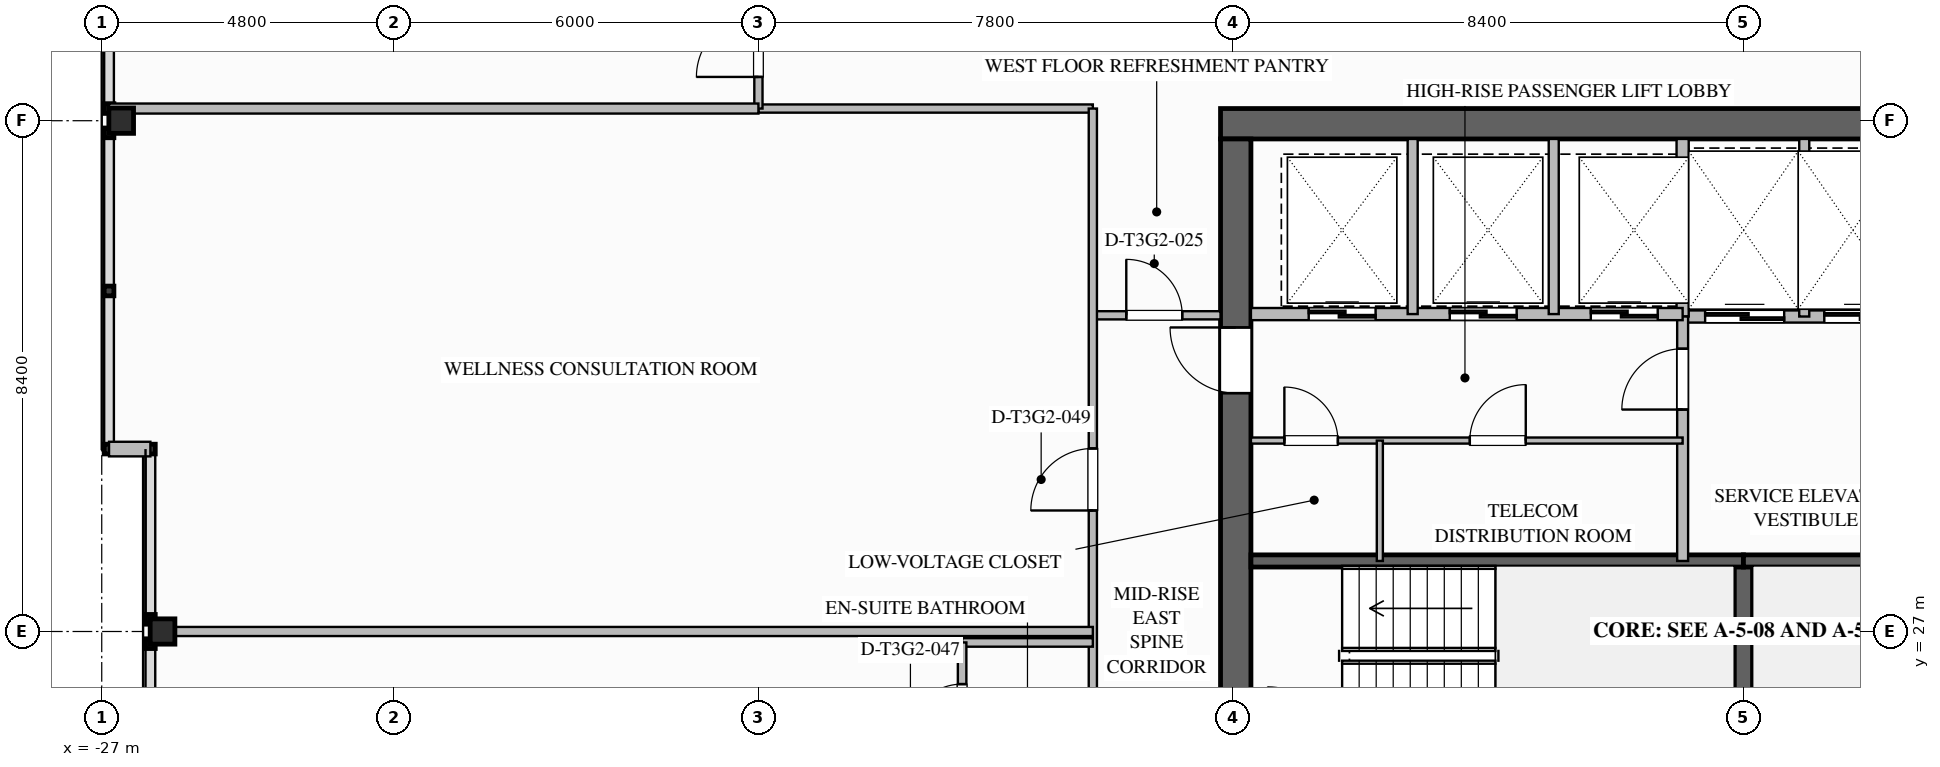
"""IFC4 building model, lengths in metres.
Left out: names, types, materials, properties, quantities, classifications, styles, units other than length and angle.
Written with IfcOpenShell. Run it as: python <this file> out.ifc"""

import sys

from ifc_helpers import new_model, si_unit, direction, frame, frame_2d, origin, origin_2d, place, context, subcontext, project, spatial, rectangle, i_section, extrude, element, fill, save


model = new_model("IFC4")
c1 = context("Model", 3, precision=1e-05, world=origin(), true_north=direction((0.0, 1.0)))
c2 = subcontext(c1, "Body", "Model", "MODEL_VIEW")
j1 = project(units=[si_unit("LENGTHUNIT", "METRE"), si_unit("PLANEANGLEUNIT", "RADIAN")], contexts=[c1])
p1 = place(None, origin())
s1 = spatial("IfcSite", under=j1, at=p1, CompositionType="ELEMENT")
p2 = place(p1, origin())
s2 = spatial("IfcBuilding", under=s1, at=p2, CompositionType="ELEMENT")
p3 = place(p2, frame((0.0, 0.0, 161.05)))
s3 = spatial("IfcBuildingStorey", under=s2, at=p3, CompositionType="ELEMENT", Elevation=161.05)
p4 = place(p3, frame((-8.6, 35.35, 0.0), z_axis=(0.0, 0.0, 1.0), x_axis=(1.0, 0.0, 0.0)))
e1 = element("IfcWall", 1, at=p4, inside=s3, PredefinedType="SHEAR", context=c2, shape_type="SweptSolid", body=[
    extrude(rectangle(XDim=17.2, YDim=0.5, at=frame_2d((8.6, 0.0))), origin(), (0.0, 0.0, 1.0), 3.55),
])
p5 = place(p3, frame((-8.35, 18.9, 0.0), z_axis=(0.0, 0.0, 1.0), x_axis=(0.0, 1.0, 0.0)))
e2 = element("IfcWall", 2, at=p5, inside=s3, PredefinedType="SHEAR", context=c2, shape_type="SweptSolid", body=[
    extrude(rectangle(XDim=16.2, YDim=0.5, at=frame_2d((8.1, 0.0))), origin(), (0.0, 0.0, 1.0), 3.55),
])
p6 = place(p5, frame((12.02, 0.0, 0.0)))
e3 = element("IfcOpeningElement", 3, at=p6, cuts=e2, PredefinedType="OPENING", context=c2, shape_type="SweptSolid", body=[
    extrude(rectangle(XDim=1.08, YDim=2.04, at=frame_2d((0.54, 1.02))), frame((0.0, 0.26, 0.0), z_axis=(0.0, -1.0, 0.0), x_axis=(1.0, 0.0, 0.0)), (0.0, 0.0, 1.0), 0.52),
])
p7 = place(p5, frame((4.5, 0.0, 0.0)))
e4 = element("IfcOpeningElement", 4, at=p7, cuts=e2, PredefinedType="OPENING", context=c2, shape_type="SweptSolid", body=[
    extrude(rectangle(XDim=1.08, YDim=2.04, at=frame_2d((0.54, 1.02))), frame((0.0, 0.26, 0.0), z_axis=(0.0, -1.0, 0.0), x_axis=(1.0, 0.0, 0.0)), (0.0, 0.0, 1.0), 0.52),
])
for number, where, z_axis, x_axis in (
    (5, (-26.0, 27.0, 0.0), (0.0, 0.0, 1.0), (1.0, 0.0, 0.0)),
    (6, (-26.68, 35.4, 0.0), (0.0, 0.0, 1.0), (1.0, 0.0, 0.0)),
):
    element("IfcColumn", number, at=place(p3, frame(where, z_axis=z_axis, x_axis=x_axis)), inside=s3, PredefinedType="COLUMN", context=c2, shape_type="SweptSolid", body=[
        extrude(i_section(OverallWidth=0.406, OverallDepth=0.416, WebThickness=0.03, FlangeThickness=0.048, FilletRadius=0.028, at=origin_2d()), origin(), (0.0, 0.0, 1.0), 3.547),
    ])
p8 = place(p3, frame((-26.2, 30.0, 0.0), z_axis=(0.0, 0.0, 1.0), x_axis=(-1.0, 0.0, 0.0)))
e7 = element("IfcWall", 7, at=p8, inside=s3, PredefinedType="STANDARD", context=c2, shape_type="SweptSolid", body=[
    extrude(rectangle(XDim=0.68, YDim=0.24, at=frame_2d((0.34, 0.0))), origin(), (0.0, 0.0, 1.0), 3.29),
])
p9 = place(p3, frame((0.0, 25.04, 0.0), z_axis=(0.0, 0.0, 1.0), x_axis=(0.0, 1.0, 0.0)))
e8 = element("IfcWall", 8, at=p9, inside=s3, PredefinedType="SOLIDWALL", context=c2, shape_type="SweptSolid", body=[
    extrude(rectangle(XDim=3.12, YDim=0.3, at=frame_2d((1.56, 0.0))), origin(), (0.0, 0.0, 1.0), 3.29),
])
p10 = place(p3, frame((-8.1, 28.16, 0.0), z_axis=(0.0, 0.0, 1.0), x_axis=(1.0, 0.0, 0.0)))
e9 = element("IfcWall", 9, at=p10, inside=s3, PredefinedType="SOLIDWALL", context=c2, shape_type="SweptSolid", body=[
    extrude(rectangle(XDim=8.1, YDim=0.2, at=frame_2d((4.05, 0.0))), origin(), (0.0, 0.0, 1.0), 3.29),
])
p11 = place(p3, frame((8.1, 28.16, 0.0), z_axis=(0.0, 0.0, 1.0), x_axis=(-1.0, 0.0, 0.0)))
e10 = element("IfcWall", 10, at=p11, inside=s3, PredefinedType="SOLIDWALL", context=c2, shape_type="SweptSolid", body=[
    extrude(rectangle(XDim=8.1, YDim=0.2, at=frame_2d((4.05, 0.0))), origin(), (0.0, 0.0, 1.0), 3.29),
])
p12 = place(p11, frame((0.28, 0.0, 0.0)))
e11 = element("IfcOpeningElement", 11, at=p12, cuts=e10, PredefinedType="OPENING", context=c2, shape_type="SweptSolid", body=[
    extrude(rectangle(XDim=1.05, YDim=2.1, at=frame_2d((0.525, 1.05))), frame((0.0, 0.11, 0.0), z_axis=(0.0, -1.0, 0.0), x_axis=(1.0, 0.0, 0.0)), (0.0, 0.0, 1.0), 0.22),
])
p13 = place(p3, frame((-1.0, 32.18, 0.0), z_axis=(0.0, 0.0, 1.0), x_axis=(1.0, 0.0, 0.0)))
e12 = element("IfcWall", 12, at=p13, inside=s3, PredefinedType="SOLIDWALL", context=c2, shape_type="SweptSolid", body=[
    extrude(rectangle(XDim=4.1, YDim=0.2, at=frame_2d((2.05, 0.0))), origin(), (0.0, 0.0, 1.0), 3.29),
])
p14 = place(p13, frame((0.37, 0.0, 0.0)))
e13 = element("IfcOpeningElement", 13, at=p14, cuts=e12, PredefinedType="OPENING", context=c2, shape_type="SweptSolid", body=[
    extrude(rectangle(XDim=1.3, YDim=2.2, at=frame_2d((0.65, 1.1))), frame((0.0, 0.11, 0.0), z_axis=(0.0, -1.0, 0.0), x_axis=(1.0, 0.0, 0.0)), (0.0, 0.0, 1.0), 0.22),
])
p15 = place(p13, frame((2.33, 0.0, 0.0)))
e14 = element("IfcOpeningElement", 14, at=p15, cuts=e12, PredefinedType="OPENING", context=c2, shape_type="SweptSolid", body=[
    extrude(rectangle(XDim=1.3, YDim=2.2, at=frame_2d((0.65, 1.1))), frame((0.0, 0.11, 0.0), z_axis=(0.0, -1.0, 0.0), x_axis=(1.0, 0.0, 0.0)), (0.0, 0.0, 1.0), 0.22),
])
p16 = place(p3, frame((-1.0, 32.18, 0.0), z_axis=(0.0, 0.0, 1.0), x_axis=(0.0, 1.0, 0.0)))
e15 = element("IfcWall", 15, at=p16, inside=s3, PredefinedType="SOLIDWALL", context=c2, shape_type="SweptSolid", body=[
    extrude(rectangle(XDim=2.92, YDim=0.2, at=frame_2d((1.46, 0.0))), origin(), (0.0, 0.0, 1.0), 3.29),
])
p17 = place(p3, frame((1.0, 32.18, 0.0), z_axis=(0.0, 0.0, 1.0), x_axis=(0.0, 1.0, 0.0)))
e16 = element("IfcWall", 16, at=p17, inside=s3, PredefinedType="PARTITIONING", context=c2, shape_type="SweptSolid", body=[
    extrude(rectangle(XDim=2.92, YDim=0.165, at=frame_2d((1.46, 0.0))), origin(), (0.0, 0.0, 1.0), 3.29),
])
p18 = place(p3, frame((-1.0, 28.16, 0.0), z_axis=(0.0, 0.0, 1.0), x_axis=(0.0, 1.0, 0.0)))
e17 = element("IfcWall", 17, at=p18, inside=s3, PredefinedType="SOLIDWALL", context=c2, shape_type="SweptSolid", body=[
    extrude(rectangle(XDim=4.02, YDim=0.18, at=frame_2d((2.01, 0.0))), origin(), (0.0, 0.0, 1.0), 3.29),
])
p19 = place(p18, frame((2.49, 0.0, 0.0)))
e18 = element("IfcOpeningElement", 18, at=p19, cuts=e17, PredefinedType="OPENING", context=c2, shape_type="SweptSolid", body=[
    extrude(rectangle(XDim=1.0, YDim=2.1, at=frame_2d((0.5, 1.05))), frame((0.0, 0.1, 0.0), z_axis=(0.0, -1.0, 0.0), x_axis=(1.0, 0.0, 0.0)), (0.0, 0.0, 1.0), 0.2),
])
p20 = place(p3, frame((-8.1, 32.22, 0.0), z_axis=(0.0, 0.0, 1.0), x_axis=(1.0, 0.0, 0.0)))
e19 = element("IfcWall", 19, at=p20, inside=s3, PredefinedType="SOLIDWALL", context=c2, shape_type="SweptSolid", body=[
    extrude(rectangle(XDim=7.1, YDim=0.2, at=frame_2d((3.55, 0.0))), origin(), (0.0, 0.0, 1.0), 3.29),
])
p21 = place(p20, frame((0.95, 0.0, 0.0)))
e20 = element("IfcOpeningElement", 20, at=p21, cuts=e19, PredefinedType="OPENING", context=c2, shape_type="SweptSolid", body=[
    extrude(rectangle(XDim=1.1, YDim=2.2, at=frame_2d((0.55, 1.1))), frame((0.0, 0.11, 0.0), z_axis=(0.0, -1.0, 0.0), x_axis=(1.0, 0.0, 0.0)), (0.0, 0.0, 1.0), 0.22),
])
p22 = place(p20, frame((3.27, 0.0, 0.0)))
e21 = element("IfcOpeningElement", 21, at=p22, cuts=e19, PredefinedType="OPENING", context=c2, shape_type="SweptSolid", body=[
    extrude(rectangle(XDim=1.1, YDim=2.2, at=frame_2d((0.55, 1.1))), frame((0.0, 0.11, 0.0), z_axis=(0.0, -1.0, 0.0), x_axis=(1.0, 0.0, 0.0)), (0.0, 0.0, 1.0), 0.22),
])
p23 = place(p20, frame((5.59, 0.0, 0.0)))
e22 = element("IfcOpeningElement", 22, at=p23, cuts=e19, PredefinedType="OPENING", context=c2, shape_type="SweptSolid", body=[
    extrude(rectangle(XDim=1.1, YDim=2.2, at=frame_2d((0.55, 1.1))), frame((0.0, 0.11, 0.0), z_axis=(0.0, -1.0, 0.0), x_axis=(1.0, 0.0, 0.0)), (0.0, 0.0, 1.0), 0.22),
])
for number, where, z_axis, x_axis in (
    (23, (-5.44, 32.22, 0.0), (0.0, 0.0, 1.0), (0.0, 1.0, 0.0)),
    (24, (-3.12, 32.22, 0.0), (0.0, 0.0, 1.0), (0.0, 1.0, 0.0)),
):
    element("IfcWall", number, at=place(p3, frame(where, z_axis=z_axis, x_axis=x_axis)), inside=s3, PredefinedType="PARTITIONING", context=c2, shape_type="SweptSolid", body=[
        extrude(rectangle(XDim=2.88, YDim=0.165, at=frame_2d((1.44, 0.0))), origin(), (0.0, 0.0, 1.0), 3.29),
    ])
p24 = place(p3, frame((-8.1, 30.14, 0.0), z_axis=(0.0, 0.0, 1.0), x_axis=(1.0, 0.0, 0.0)))
e25 = element("IfcWall", 25, at=p24, inside=s3, PredefinedType="PARTITIONING", context=c2, shape_type="SweptSolid", body=[
    extrude(rectangle(XDim=7.1, YDim=0.1, at=frame_2d((3.55, 0.0))), origin(), (0.0, 0.0, 1.0), 3.29),
])
p25 = place(p24, frame((0.55, 0.0, 0.0)))
e26 = element("IfcOpeningElement", 26, at=p25, cuts=e25, PredefinedType="OPENING", context=c2, shape_type="SweptSolid", body=[
    extrude(rectangle(XDim=0.88, YDim=2.1, at=frame_2d((0.44, 1.05))), frame((0.0, 0.06, 0.0), z_axis=(0.0, -1.0, 0.0), x_axis=(1.0, 0.0, 0.0)), (0.0, 0.0, 1.0), 0.12),
])
p26 = place(p24, frame((3.6, 0.0, 0.0)))
e27 = element("IfcOpeningElement", 27, at=p26, cuts=e25, PredefinedType="OPENING", context=c2, shape_type="SweptSolid", body=[
    extrude(rectangle(XDim=0.92, YDim=2.1, at=frame_2d((0.46, 1.05))), frame((0.0, 0.06, 0.0), z_axis=(0.0, -1.0, 0.0), x_axis=(1.0, 0.0, 0.0)), (0.0, 0.0, 1.0), 0.12),
])
p27 = place(p3, frame((-5.98, 28.16, 0.0), z_axis=(0.0, 0.0, 1.0), x_axis=(0.0, 1.0, 0.0)))
e28 = element("IfcWall", 28, at=p27, inside=s3, PredefinedType="PARTITIONING", context=c2, shape_type="SweptSolid", body=[
    extrude(rectangle(XDim=1.98, YDim=0.1, at=frame_2d((0.99, 0.0))), origin(), (0.0, 0.0, 1.0), 3.29),
])
p28 = place(p3, frame((-10.7, 32.2, 0.0), z_axis=(0.0, 0.0, 1.0), x_axis=(1.0, 0.0, 0.0)))
e29 = element("IfcWall", 29, at=p28, inside=s3, PredefinedType="PARTITIONING", context=c2, shape_type="SweptSolid", body=[
    extrude(rectangle(XDim=2.1, YDim=0.135, at=frame_2d((1.05, 0.0))), origin(), (0.0, 0.0, 1.0), 3.29),
])
p29 = place(p28, frame((0.55, 0.0, 0.0)))
e30 = element("IfcOpeningElement", 30, at=p29, cuts=e29, PredefinedType="OPENING", context=c2, shape_type="SweptSolid", body=[
    extrude(rectangle(XDim=0.92, YDim=2.1, at=frame_2d((0.46, 1.05))), frame((0.0, 0.077, 0.0), z_axis=(0.0, -1.0, 0.0), x_axis=(1.0, 0.0, 0.0)), (0.0, 0.0, 1.0), 0.155),
])
p30 = place(p3, frame((-16.2, 35.6, 0.0), z_axis=(0.0, 0.0, 1.0), x_axis=(1.0, 0.0, 0.0)))
e31 = element("IfcWall", 31, at=p30, inside=s3, PredefinedType="PARTITIONING", context=c2, shape_type="SweptSolid", body=[
    extrude(rectangle(XDim=5.5, YDim=0.135, at=frame_2d((2.75, 0.0))), origin(), (0.0, 0.0, 1.0), 2.667),
])
p31 = place(p3, frame((-10.7, 18.4, 0.0), z_axis=(0.0, 0.0, 1.0), x_axis=(0.0, 1.0, 0.0)))
e32 = element("IfcWall", 32, at=p31, inside=s3, PredefinedType="PARTITIONING", context=c2, shape_type="SweptSolid", body=[
    extrude(rectangle(XDim=17.2, YDim=0.135, at=frame_2d((8.6, 0.0))), origin(), (0.0, 0.0, 1.0), 3.29),
])
p32 = place(p31, frame((4.255, 0.0, 0.0)))
e33 = element("IfcOpeningElement", 33, at=p32, cuts=e32, PredefinedType="OPENING", context=c2, shape_type="SweptSolid", body=[
    extrude(rectangle(XDim=1.26, YDim=2.2, at=frame_2d((0.63, 1.1))), frame((0.0, 0.077, 0.0), z_axis=(0.0, -1.0, 0.0), x_axis=(1.0, 0.0, 0.0)), (0.0, 0.0, 1.0), 0.155),
])
p33 = place(p31, frame((10.59, 0.0, 0.0)))
e34 = element("IfcOpeningElement", 34, at=p33, cuts=e32, PredefinedType="OPENING", context=c2, shape_type="SweptSolid", body=[
    extrude(rectangle(XDim=1.02, YDim=2.15, at=frame_2d((0.51, 1.075))), frame((0.0, 0.077, 0.0), z_axis=(0.0, -1.0, 0.0), x_axis=(1.0, 0.0, 0.0)), (0.0, 0.0, 1.0), 0.155),
])
p34 = place(p3, frame((-16.2, 35.6, 0.0), z_axis=(0.0, 0.0, 1.0), x_axis=(0.0, 1.0, 0.0)))
e35 = element("IfcWall", 35, at=p34, inside=s3, PredefinedType="PARTITIONING", context=c2, shape_type="SweptSolid", body=[
    extrude(rectangle(XDim=2.7, YDim=0.135, at=frame_2d((1.35, 0.0))), origin(), (0.0, 0.0, 1.0), 2.58),
])
p35 = place(p34, frame((0.52, 0.0, 0.0)))
e36 = element("IfcOpeningElement", 36, at=p35, cuts=e35, PredefinedType="OPENING", context=c2, shape_type="SweptSolid", body=[
    extrude(rectangle(XDim=1.02, YDim=2.15, at=frame_2d((0.51, 1.075))), frame((0.0, 0.077, 0.0), z_axis=(0.0, -1.0, 0.0), x_axis=(1.0, 0.0, 0.0)), (0.0, 0.0, 1.0), 0.155),
])
p36 = place(p3, frame((-26.88, 35.6, 0.0), z_axis=(0.0, 0.0, 1.0), x_axis=(1.0, 0.0, 0.0)))
e37 = element("IfcWall", 37, at=p36, inside=s3, PredefinedType="PARTITIONING", context=c2, shape_type="SweptSolid", body=[
    extrude(rectangle(XDim=10.68, YDim=0.165, at=frame_2d((5.34, 0.0))), origin(), (0.0, 0.0, 1.0), 2.58),
])
p37 = place(p3, frame((-26.2, 27.0, 0.0), z_axis=(0.0, 0.0, 1.0), x_axis=(1.0, 0.0, 0.0)))
e38 = element("IfcWall", 38, at=p37, inside=s3, PredefinedType="PARTITIONING", context=c2, shape_type="SweptSolid", body=[
    extrude(rectangle(XDim=15.5, YDim=0.15, at=frame_2d((7.75, 0.0))), origin(), (0.0, 0.0, 1.0), 2.58),
])
p38 = place(p3, frame((-10.7, 26.82, 0.0), z_axis=(0.0, 0.0, 1.0), x_axis=(-1.0, 0.0, 0.0)))
e39 = element("IfcWall", 39, at=p38, inside=s3, PredefinedType="PLUMBINGWALL", context=c2, shape_type="SweptSolid", body=[
    extrude(rectangle(XDim=2.15, YDim=0.14, at=frame_2d((1.075, 0.0))), origin(), (0.0, 0.0, 1.0), 2.667),
])
p39 = place(p3, frame((-12.85, 24.57, 0.0), z_axis=(0.0, 0.0, 1.0), x_axis=(0.0, 1.0, 0.0)))
e40 = element("IfcWall", 40, at=p39, inside=s3, PredefinedType="PLUMBINGWALL", context=c2, shape_type="SweptSolid", body=[
    extrude(rectangle(XDim=2.25, YDim=0.14, at=frame_2d((1.125, 0.0))), origin(), (0.0, 0.0, 1.0), 3.29),
])
p40 = place(p39, frame((0.685, 0.0, 0.0)))
e41 = element("IfcOpeningElement", 41, at=p40, cuts=e40, PredefinedType="OPENING", context=c2, shape_type="SweptSolid", body=[
    extrude(rectangle(XDim=0.88, YDim=2.1, at=frame_2d((0.44, 1.05))), frame((0.0, 0.08, 0.0), z_axis=(0.0, -1.0, 0.0), x_axis=(1.0, 0.0, 0.0)), (0.0, 0.0, 1.0), 0.16),
])
p41 = place(p14, origin())
e42 = element("IfcDoor", 42, at=p41, inside=s3, OperationType="SLIDING_TO_LEFT", PredefinedType="DOOR", context=c2, shape_type="SweptSolid", body=[
    extrude(rectangle(XDim=1.3, YDim=2.2, at=frame_2d((0.65, 1.1))), frame((0.0, 0.025, 0.0), z_axis=(0.0, -1.0, 0.0), x_axis=(1.0, 0.0, 0.0)), (0.0, 0.0, 1.0), 0.05),
])
fill(e13, e42)
p42 = place(p15, origin())
e43 = element("IfcDoor", 43, at=p42, inside=s3, OperationType="SLIDING_TO_LEFT", PredefinedType="DOOR", context=c2, shape_type="SweptSolid", body=[
    extrude(rectangle(XDim=1.3, YDim=2.2, at=frame_2d((0.65, 1.1))), frame((0.0, 0.025, 0.0), z_axis=(0.0, -1.0, 0.0), x_axis=(1.0, 0.0, 0.0)), (0.0, 0.0, 1.0), 0.05),
])
fill(e14, e43)
p43 = place(p19, origin())
e44 = element("IfcDoor", 44, at=p43, inside=s3, OperationType="SINGLE_SWING_LEFT", PredefinedType="DOOR", context=c2, shape_type="SweptSolid", body=[
    extrude(rectangle(XDim=1.0, YDim=2.1, at=frame_2d((0.5, 1.05))), frame((0.0, 0.025, 0.0), z_axis=(0.0, -1.0, 0.0), x_axis=(1.0, 0.0, 0.0)), (0.0, 0.0, 1.0), 0.05),
])
fill(e18, e44)
p44 = place(p21, origin())
e45 = element("IfcDoor", 45, at=p44, inside=s3, OperationType="SLIDING_TO_LEFT", PredefinedType="DOOR", context=c2, shape_type="SweptSolid", body=[
    extrude(rectangle(XDim=1.1, YDim=2.2, at=frame_2d((0.55, 1.1))), frame((0.0, 0.025, 0.0), z_axis=(0.0, -1.0, 0.0), x_axis=(1.0, 0.0, 0.0)), (0.0, 0.0, 1.0), 0.05),
])
fill(e20, e45)
p45 = place(p22, origin())
e46 = element("IfcDoor", 46, at=p45, inside=s3, OperationType="SLIDING_TO_LEFT", PredefinedType="DOOR", context=c2, shape_type="SweptSolid", body=[
    extrude(rectangle(XDim=1.1, YDim=2.2, at=frame_2d((0.55, 1.1))), frame((0.0, 0.025, 0.0), z_axis=(0.0, -1.0, 0.0), x_axis=(1.0, 0.0, 0.0)), (0.0, 0.0, 1.0), 0.05),
])
fill(e21, e46)
p46 = place(p23, origin())
e47 = element("IfcDoor", 47, at=p46, inside=s3, OperationType="SLIDING_TO_LEFT", PredefinedType="DOOR", context=c2, shape_type="SweptSolid", body=[
    extrude(rectangle(XDim=1.1, YDim=2.2, at=frame_2d((0.55, 1.1))), frame((0.0, 0.025, 0.0), z_axis=(0.0, -1.0, 0.0), x_axis=(1.0, 0.0, 0.0)), (0.0, 0.0, 1.0), 0.05),
])
fill(e22, e47)
p47 = place(p6, origin())
e48 = element("IfcDoor", 48, at=p47, inside=s3, OperationType="SINGLE_SWING_RIGHT", PredefinedType="DOOR", context=c2, shape_type="SweptSolid", body=[
    extrude(rectangle(XDim=1.08, YDim=2.04, at=frame_2d((0.54, 1.02))), frame((0.0, 0.025, 0.0), z_axis=(0.0, -1.0, 0.0), x_axis=(1.0, 0.0, 0.0)), (0.0, 0.0, 1.0), 0.05),
])
fill(e3, e48)
p48 = place(p25, origin())
e49 = element("IfcDoor", 49, at=p48, inside=s3, OperationType="SINGLE_SWING_LEFT", PredefinedType="DOOR", context=c2, shape_type="SweptSolid", body=[
    extrude(rectangle(XDim=0.88, YDim=2.1, at=frame_2d((0.44, 1.05))), frame((0.0, 0.025, 0.0), z_axis=(0.0, -1.0, 0.0), x_axis=(1.0, 0.0, 0.0)), (0.0, 0.0, 1.0), 0.05),
])
fill(e26, e49)
p49 = place(p26, origin())
e50 = element("IfcDoor", 50, at=p49, inside=s3, OperationType="SINGLE_SWING_RIGHT", PredefinedType="DOOR", context=c2, shape_type="SweptSolid", body=[
    extrude(rectangle(XDim=0.92, YDim=2.1, at=frame_2d((0.46, 1.05))), frame((0.0, 0.025, 0.0), z_axis=(0.0, -1.0, 0.0), x_axis=(1.0, 0.0, 0.0)), (0.0, 0.0, 1.0), 0.05),
])
fill(e27, e50)
p50 = place(p29, origin())
e51 = element("IfcDoor", 51, at=p50, inside=s3, OperationType="SINGLE_SWING_LEFT", PredefinedType="DOOR", context=c2, shape_type="SweptSolid", body=[
    extrude(rectangle(XDim=0.92, YDim=2.1, at=frame_2d((0.46, 1.05))), frame((0.0, 0.025, 0.0), z_axis=(0.0, -1.0, 0.0), x_axis=(1.0, 0.0, 0.0)), (0.0, 0.0, 1.0), 0.05),
])
fill(e30, e51)
p51 = place(p35, origin())
e52 = element("IfcDoor", 52, at=p51, inside=s3, OperationType="SINGLE_SWING_LEFT", PredefinedType="DOOR", context=c2, shape_type="SweptSolid", body=[
    extrude(rectangle(XDim=1.02, YDim=2.15, at=frame_2d((0.51, 1.075))), frame((0.0, 0.025, 0.0), z_axis=(0.0, -1.0, 0.0), x_axis=(1.0, 0.0, 0.0)), (0.0, 0.0, 1.0), 0.05),
])
fill(e36, e52)
p52 = place(p40, origin())
e53 = element("IfcDoor", 53, at=p52, inside=s3, OperationType="SINGLE_SWING_LEFT", PredefinedType="DOOR", context=c2, shape_type="SweptSolid", body=[
    extrude(rectangle(XDim=0.88, YDim=2.1, at=frame_2d((0.44, 1.05))), frame((0.0, 0.025, 0.0), z_axis=(0.0, -1.0, 0.0), x_axis=(1.0, 0.0, 0.0)), (0.0, 0.0, 1.0), 0.05),
])
fill(e41, e53)
p53 = place(p33, origin())
e54 = element("IfcDoor", 54, at=p53, inside=s3, OperationType="SINGLE_SWING_LEFT", PredefinedType="DOOR", context=c2, shape_type="SweptSolid", body=[
    extrude(rectangle(XDim=1.02, YDim=2.15, at=frame_2d((0.51, 1.075))), frame((0.0, 0.025, 0.0), z_axis=(0.0, -1.0, 0.0), x_axis=(1.0, 0.0, 0.0)), (0.0, 0.0, 1.0), 0.05),
])
fill(e34, e54)
save(model, sys.argv[1])
